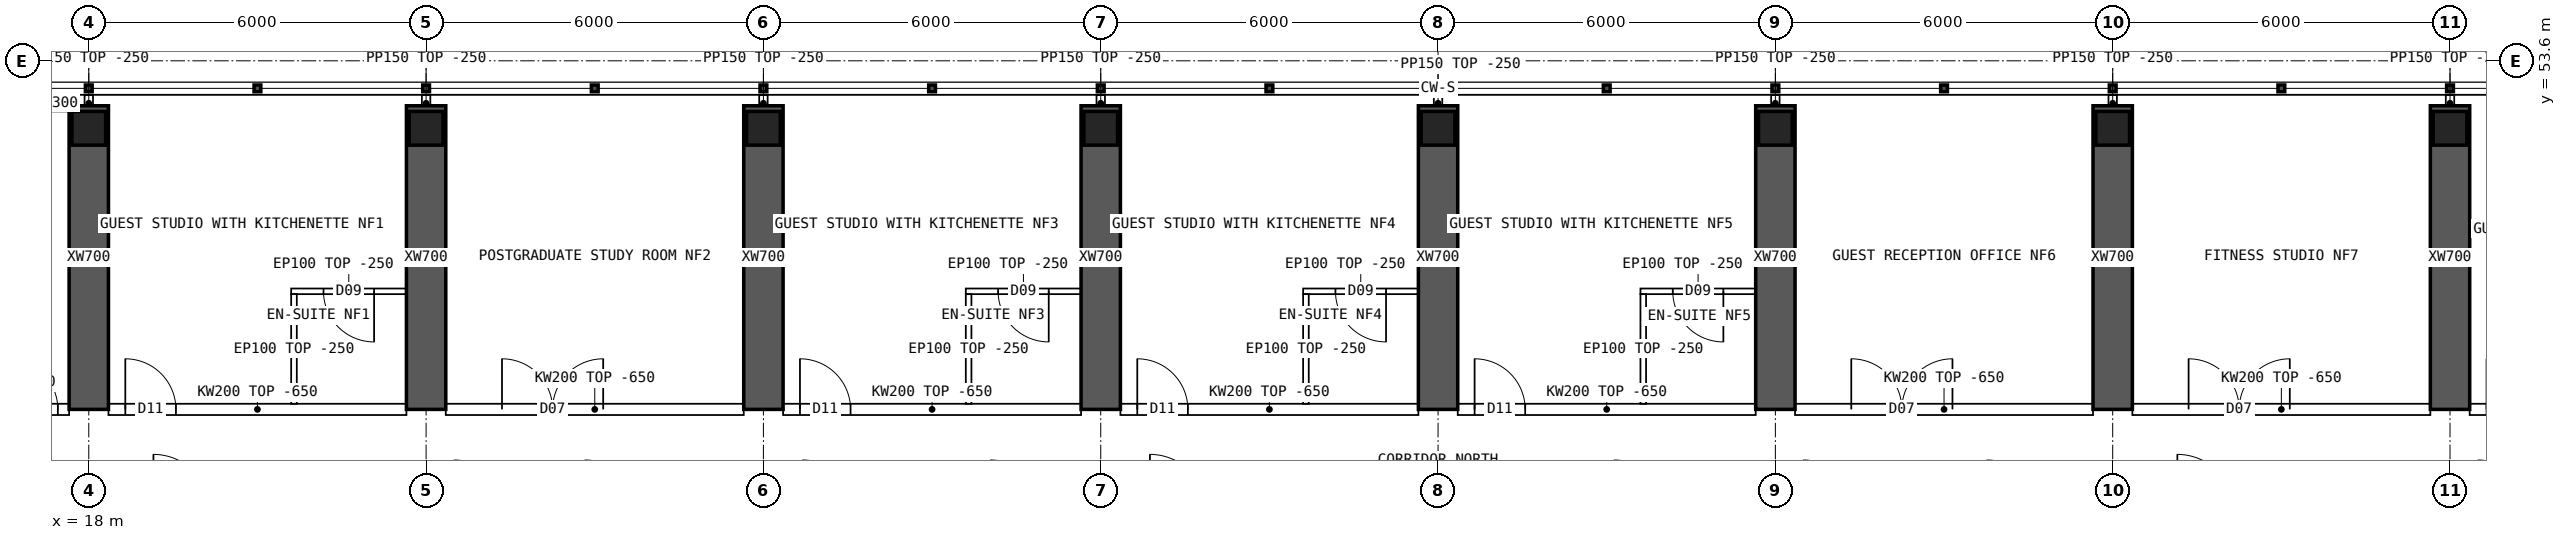
"""IFC4 building model, lengths in metres.
Left out: names, types, materials, properties, quantities, classifications, styles, units other than length and angle.
Written with IfcOpenShell. Run it as: python <this file> out.ifc"""

import sys

from ifc_helpers import new_model, si_unit, direction, frame, frame_2d, origin, origin_2d, place, context, subcontext, project, spatial, polyline, rectangle, hollow_rectangle, outline, extrude, element, fill, save


model = new_model("IFC4")
c1 = context("Model", 3, precision=1e-05, world=origin(), true_north=direction((0.0, 1.0)))
c2 = subcontext(c1, "Body", "Model", "MODEL_VIEW")
j1 = project(units=[si_unit("LENGTHUNIT", "METRE"), si_unit("PLANEANGLEUNIT", "RADIAN")], contexts=[c1])
p1 = place(None, origin())
s1 = spatial("IfcSite", under=j1, at=p1, CompositionType="ELEMENT")
p2 = place(p1, origin())
s2 = spatial("IfcBuilding", under=s1, at=p2, CompositionType="ELEMENT")
p3 = place(p2, frame((0.0, 0.0, 208.3)))
s3 = spatial("IfcBuildingStorey", under=s2, at=p3, CompositionType="ELEMENT", Elevation=208.3)
for number, where, z_axis, x_axis in (
    (1, (18.0, 52.4, 0.0), (0.0, 0.0, 1.0), (1.0, 0.0, 0.0)),
    (2, (24.0, 52.4, 0.0), (0.0, 0.0, 1.0), (1.0, 0.0, 0.0)),
    (3, (30.0, 52.4, 0.0), (0.0, 0.0, 1.0), (1.0, 0.0, 0.0)),
    (4, (36.0, 52.4, 0.0), (0.0, 0.0, 1.0), (1.0, 0.0, 0.0)),
    (5, (42.0, 52.4, 0.0), (0.0, 0.0, 1.0), (1.0, 0.0, 0.0)),
    (6, (48.0, 52.4, 0.0), (0.0, 0.0, 1.0), (1.0, 0.0, 0.0)),
    (7, (54.0, 52.4, 0.0), (0.0, 0.0, 1.0), (1.0, 0.0, 0.0)),
    (8, (60.0, 52.4, 0.0), (0.0, 0.0, 1.0), (1.0, 0.0, 0.0)),
):
    element("IfcColumn", number, at=place(p3, frame(where, z_axis=z_axis, x_axis=x_axis)), inside=s3, PredefinedType="COLUMN", context=c2, shape_type="SweptSolid", body=[
        extrude(hollow_rectangle(XDim=0.6, YDim=0.6, WallThickness=0.06, at=origin_2d()), origin(), (0.0, 0.0, 1.0), 4.5),
    ])
for number, where, z_axis, x_axis in (
    (9, (18.0, 47.4, 0.0), (0.0, 0.0, 1.0), (0.0, 1.0, 0.0)),
    (10, (24.0, 47.4, 0.0), (0.0, 0.0, 1.0), (0.0, 1.0, 0.0)),
    (11, (30.0, 47.4, 0.0), (0.0, 0.0, 1.0), (0.0, 1.0, 0.0)),
    (12, (36.0, 47.4, 0.0), (0.0, 0.0, 1.0), (0.0, 1.0, 0.0)),
    (13, (42.0, 47.4, 0.0), (0.0, 0.0, 1.0), (0.0, 1.0, 0.0)),
    (14, (48.0, 47.4, 0.0), (0.0, 0.0, 1.0), (0.0, 1.0, 0.0)),
    (15, (54.0, 47.4, 0.0), (0.0, 0.0, 1.0), (0.0, 1.0, 0.0)),
    (16, (60.0, 47.4, 0.0), (0.0, 0.0, 1.0), (0.0, 1.0, 0.0)),
):
    element("IfcWall", number, at=place(p3, frame(where, z_axis=z_axis, x_axis=x_axis)), inside=s3, PredefinedType="SHEAR", context=c2, shape_type="SweptSolid", body=[
        extrude(rectangle(XDim=5.4, YDim=0.7, at=frame_2d((2.7, 0.0))), origin(), (0.0, 0.0, 1.0), 4.5),
    ])
p4 = place(p3, frame((17.2, 52.85, 0.0), z_axis=(0.0, 0.0, 1.0), x_axis=(1.0, 0.0, 0.0)))
e17 = element("IfcWall", 17, at=p4, inside=s3, PredefinedType="SOLIDWALL", context=c2, shape_type="SweptSolid", body=[
    extrude(rectangle(XDim=0.45, YDim=0.3, at=frame_2d((0.225, 0.0))), origin(), (0.0, 0.0, 1.0), 4.25),
])
p5 = place(p3, frame((15.6, 47.4, 0.0), z_axis=(0.0, 0.0, 1.0), x_axis=(1.0, 0.0, 0.0)))
e18 = element("IfcWall", 18, at=p5, inside=s3, PredefinedType="SOLIDWALL", context=c2, shape_type="SweptSolid", body=[
    extrude(rectangle(XDim=2.05, YDim=0.2, at=frame_2d((1.025, 0.0))), origin(), (0.0, 0.0, 1.0), 4.25),
])
p6 = place(p5, frame((0.95, 0.0, 0.0)))
e19 = element("IfcOpeningElement", 19, at=p6, cuts=e18, PredefinedType="OPENING", context=c2, shape_type="SweptSolid", body=[
    extrude(rectangle(XDim=0.9, YDim=2.1, at=frame_2d((0.45, 1.05))), frame((0.0, 0.11, 0.0), z_axis=(0.0, -1.0, 0.0), x_axis=(1.0, 0.0, 0.0)), (0.0, 0.0, 1.0), 0.22),
])
p7 = place(p3, frame((18.35, 47.4, 0.0), z_axis=(0.0, 0.0, 1.0), x_axis=(1.0, 0.0, 0.0)))
e20 = element("IfcWall", 20, at=p7, inside=s3, PredefinedType="SOLIDWALL", context=c2, shape_type="SweptSolid", body=[
    extrude(outline(polyline([(0.0, 0.0), (5.3, 0.0), (5.3, 3.85), (0.0, 3.85), (0.0, 0.0)])), frame((0.0, 0.1, 0.0), z_axis=(0.0, -1.0, 0.0), x_axis=(1.0, 0.0, 0.0)), (0.0, 0.0, 1.0), 0.2),
])
p8 = place(p7, frame((0.3, 0.0, 0.0)))
e21 = element("IfcOpeningElement", 21, at=p8, cuts=e20, PredefinedType="OPENING", context=c2, shape_type="SweptSolid", body=[
    extrude(rectangle(XDim=0.9, YDim=2.1, at=frame_2d((0.45, 1.05))), frame((0.0, 0.11, 0.0), z_axis=(0.0, -1.0, 0.0), x_axis=(1.0, 0.0, 0.0)), (0.0, 0.0, 1.0), 0.22),
])
p9 = place(p3, frame((24.35, 47.4, 0.0), z_axis=(0.0, 0.0, 1.0), x_axis=(1.0, 0.0, 0.0)))
e22 = element("IfcWall", 22, at=p9, inside=s3, PredefinedType="SOLIDWALL", context=c2, shape_type="SweptSolid", body=[
    extrude(outline(polyline([(0.0, 0.0), (5.3, 0.0), (5.3, 3.85), (0.0, 3.85), (0.0, 0.0)])), frame((0.0, 0.1, 0.0), z_axis=(0.0, -1.0, 0.0), x_axis=(1.0, 0.0, 0.0)), (0.0, 0.0, 1.0), 0.2),
])
p10 = place(p9, frame((1.0, 0.0, 0.0)))
e23 = element("IfcOpeningElement", 23, at=p10, cuts=e22, PredefinedType="OPENING", context=c2, shape_type="SweptSolid", body=[
    extrude(rectangle(XDim=1.8, YDim=2.1, at=frame_2d((0.9, 1.05))), frame((0.0, 0.11, 0.0), z_axis=(0.0, -1.0, 0.0), x_axis=(1.0, 0.0, 0.0)), (0.0, 0.0, 1.0), 0.22),
])
p11 = place(p3, frame((30.35, 47.4, 0.0), z_axis=(0.0, 0.0, 1.0), x_axis=(1.0, 0.0, 0.0)))
e24 = element("IfcWall", 24, at=p11, inside=s3, PredefinedType="SOLIDWALL", context=c2, shape_type="SweptSolid", body=[
    extrude(outline(polyline([(0.0, 0.0), (5.3, 0.0), (5.3, 3.85), (0.0, 3.85), (0.0, 0.0)])), frame((0.0, 0.1, 0.0), z_axis=(0.0, -1.0, 0.0), x_axis=(1.0, 0.0, 0.0)), (0.0, 0.0, 1.0), 0.2),
])
p12 = place(p11, frame((0.3, 0.0, 0.0)))
e25 = element("IfcOpeningElement", 25, at=p12, cuts=e24, PredefinedType="OPENING", context=c2, shape_type="SweptSolid", body=[
    extrude(rectangle(XDim=0.9, YDim=2.1, at=frame_2d((0.45, 1.05))), frame((0.0, 0.11, 0.0), z_axis=(0.0, -1.0, 0.0), x_axis=(1.0, 0.0, 0.0)), (0.0, 0.0, 1.0), 0.22),
])
p13 = place(p3, frame((36.35, 47.4, 0.0), z_axis=(0.0, 0.0, 1.0), x_axis=(1.0, 0.0, 0.0)))
e26 = element("IfcWall", 26, at=p13, inside=s3, PredefinedType="SOLIDWALL", context=c2, shape_type="SweptSolid", body=[
    extrude(outline(polyline([(0.0, 0.0), (5.3, 0.0), (5.3, 3.85), (0.0, 3.85), (0.0, 0.0)])), frame((0.0, 0.1, 0.0), z_axis=(0.0, -1.0, 0.0), x_axis=(1.0, 0.0, 0.0)), (0.0, 0.0, 1.0), 0.2),
])
p14 = place(p13, frame((0.3, 0.0, 0.0)))
e27 = element("IfcOpeningElement", 27, at=p14, cuts=e26, PredefinedType="OPENING", context=c2, shape_type="SweptSolid", body=[
    extrude(rectangle(XDim=0.9, YDim=2.1, at=frame_2d((0.45, 1.05))), frame((0.0, 0.11, 0.0), z_axis=(0.0, -1.0, 0.0), x_axis=(1.0, 0.0, 0.0)), (0.0, 0.0, 1.0), 0.22),
])
p15 = place(p3, frame((42.35, 47.4, 0.0), z_axis=(0.0, 0.0, 1.0), x_axis=(1.0, 0.0, 0.0)))
e28 = element("IfcWall", 28, at=p15, inside=s3, PredefinedType="SOLIDWALL", context=c2, shape_type="SweptSolid", body=[
    extrude(outline(polyline([(0.0, 0.0), (5.3, 0.0), (5.3, 3.85), (0.0, 3.85), (0.0, 0.0)])), frame((0.0, 0.1, 0.0), z_axis=(0.0, -1.0, 0.0), x_axis=(1.0, 0.0, 0.0)), (0.0, 0.0, 1.0), 0.2),
])
p16 = place(p15, frame((0.3, 0.0, 0.0)))
e29 = element("IfcOpeningElement", 29, at=p16, cuts=e28, PredefinedType="OPENING", context=c2, shape_type="SweptSolid", body=[
    extrude(rectangle(XDim=0.9, YDim=2.1, at=frame_2d((0.45, 1.05))), frame((0.0, 0.11, 0.0), z_axis=(0.0, -1.0, 0.0), x_axis=(1.0, 0.0, 0.0)), (0.0, 0.0, 1.0), 0.22),
])
p17 = place(p3, frame((48.35, 47.4, 0.0), z_axis=(0.0, 0.0, 1.0), x_axis=(1.0, 0.0, 0.0)))
e30 = element("IfcWall", 30, at=p17, inside=s3, PredefinedType="SOLIDWALL", context=c2, shape_type="SweptSolid", body=[
    extrude(outline(polyline([(0.0, 0.0), (5.3, 0.0), (5.3, 3.85), (0.0, 3.85), (0.0, 0.0)])), frame((0.0, 0.1, 0.0), z_axis=(0.0, -1.0, 0.0), x_axis=(1.0, 0.0, 0.0)), (0.0, 0.0, 1.0), 0.2),
])
p18 = place(p17, frame((1.0, 0.0, 0.0)))
e31 = element("IfcOpeningElement", 31, at=p18, cuts=e30, PredefinedType="OPENING", context=c2, shape_type="SweptSolid", body=[
    extrude(rectangle(XDim=1.8, YDim=2.1, at=frame_2d((0.9, 1.05))), frame((0.0, 0.11, 0.0), z_axis=(0.0, -1.0, 0.0), x_axis=(1.0, 0.0, 0.0)), (0.0, 0.0, 1.0), 0.22),
])
p19 = place(p3, frame((54.35, 47.4, 0.0), z_axis=(0.0, 0.0, 1.0), x_axis=(1.0, 0.0, 0.0)))
e32 = element("IfcWall", 32, at=p19, inside=s3, PredefinedType="SOLIDWALL", context=c2, shape_type="SweptSolid", body=[
    extrude(outline(polyline([(0.0, 0.0), (5.3, 0.0), (5.3, 3.85), (0.0, 3.85), (0.0, 0.0)])), frame((0.0, 0.1, 0.0), z_axis=(0.0, -1.0, 0.0), x_axis=(1.0, 0.0, 0.0)), (0.0, 0.0, 1.0), 0.2),
])
p20 = place(p19, frame((1.0, 0.0, 0.0)))
e33 = element("IfcOpeningElement", 33, at=p20, cuts=e32, PredefinedType="OPENING", context=c2, shape_type="SweptSolid", body=[
    extrude(rectangle(XDim=1.8, YDim=2.1, at=frame_2d((0.9, 1.05))), frame((0.0, 0.11, 0.0), z_axis=(0.0, -1.0, 0.0), x_axis=(1.0, 0.0, 0.0)), (0.0, 0.0, 1.0), 0.22),
])
p21 = place(p3, frame((60.35, 47.4, 0.0), z_axis=(0.0, 0.0, 1.0), x_axis=(1.0, 0.0, 0.0)))
e34 = element("IfcWall", 34, at=p21, inside=s3, PredefinedType="SOLIDWALL", context=c2, shape_type="SweptSolid", body=[
    extrude(outline(polyline([(0.0, 0.0), (5.3, 0.0), (5.3, 3.85), (0.0, 3.85), (0.0, 0.0)])), frame((0.0, 0.1, 0.0), z_axis=(0.0, -1.0, 0.0), x_axis=(1.0, 0.0, 0.0)), (0.0, 0.0, 1.0), 0.2),
])
p22 = place(p21, frame((0.3, 0.0, 0.0)))
e35 = element("IfcOpeningElement", 35, at=p22, cuts=e34, PredefinedType="OPENING", context=c2, shape_type="SweptSolid", body=[
    extrude(rectangle(XDim=0.9, YDim=2.1, at=frame_2d((0.45, 1.05))), frame((0.0, 0.11, 0.0), z_axis=(0.0, -1.0, 0.0), x_axis=(1.0, 0.0, 0.0)), (0.0, 0.0, 1.0), 0.22),
])
p23 = place(p3, frame((21.6, 49.5, 0.0), z_axis=(0.0, 0.0, 1.0), x_axis=(1.0, 0.0, 0.0)))
e36 = element("IfcWall", 36, at=p23, inside=s3, PredefinedType="PARTITIONING", context=c2, shape_type="SweptSolid", body=[
    extrude(rectangle(XDim=2.05, YDim=0.1, at=frame_2d((1.025, 0.0))), origin(), (0.0, 0.0, 1.0), 4.25),
])
p24 = place(p23, frame((0.575, 0.0, 0.0)))
e37 = element("IfcOpeningElement", 37, at=p24, cuts=e36, PredefinedType="OPENING", context=c2, shape_type="SweptSolid", body=[
    extrude(rectangle(XDim=0.9, YDim=2.1, at=frame_2d((0.45, 1.05))), frame((0.0, 0.06, 0.0), z_axis=(0.0, -1.0, 0.0), x_axis=(1.0, 0.0, 0.0)), (0.0, 0.0, 1.0), 0.12),
])
p25 = place(p3, frame((21.65, 49.45, 0.0), z_axis=(0.0, 0.0, 1.0), x_axis=(0.0, -1.0, 0.0)))
e38 = element("IfcWall", 38, at=p25, inside=s3, PredefinedType="PARTITIONING", context=c2, shape_type="SweptSolid", body=[
    extrude(outline(polyline([(0.0, 0.0), (1.95, 0.0), (1.95, 3.85), (1.902, 3.85), (1.9, 4.25), (0.0, 4.25), (0.0, 0.0)])), frame((0.0, 0.05, 0.0), z_axis=(0.0, -1.0, 0.0), x_axis=(1.0, 0.0, 0.0)), (0.0, 0.0, 1.0), 0.1),
])
p26 = place(p3, frame((33.6, 49.5, 0.0), z_axis=(0.0, 0.0, 1.0), x_axis=(1.0, 0.0, 0.0)))
e39 = element("IfcWall", 39, at=p26, inside=s3, PredefinedType="PARTITIONING", context=c2, shape_type="SweptSolid", body=[
    extrude(rectangle(XDim=2.05, YDim=0.1, at=frame_2d((1.025, 0.0))), origin(), (0.0, 0.0, 1.0), 4.25),
])
p27 = place(p26, frame((0.575, 0.0, 0.0)))
e40 = element("IfcOpeningElement", 40, at=p27, cuts=e39, PredefinedType="OPENING", context=c2, shape_type="SweptSolid", body=[
    extrude(rectangle(XDim=0.9, YDim=2.1, at=frame_2d((0.45, 1.05))), frame((0.0, 0.06, 0.0), z_axis=(0.0, -1.0, 0.0), x_axis=(1.0, 0.0, 0.0)), (0.0, 0.0, 1.0), 0.12),
])
p28 = place(p3, frame((33.65, 49.45, 0.0), z_axis=(0.0, 0.0, 1.0), x_axis=(0.0, -1.0, 0.0)))
e41 = element("IfcWall", 41, at=p28, inside=s3, PredefinedType="PARTITIONING", context=c2, shape_type="SweptSolid", body=[
    extrude(outline(polyline([(0.0, 0.0), (1.95, 0.0), (1.95, 3.85), (1.902, 3.85), (1.9, 4.25), (0.0, 4.25), (0.0, 0.0)])), frame((0.0, 0.05, 0.0), z_axis=(0.0, -1.0, 0.0), x_axis=(1.0, 0.0, 0.0)), (0.0, 0.0, 1.0), 0.1),
])
p29 = place(p3, frame((39.6, 49.5, 0.0), z_axis=(0.0, 0.0, 1.0), x_axis=(1.0, 0.0, 0.0)))
e42 = element("IfcWall", 42, at=p29, inside=s3, PredefinedType="PARTITIONING", context=c2, shape_type="SweptSolid", body=[
    extrude(rectangle(XDim=2.05, YDim=0.1, at=frame_2d((1.025, 0.0))), origin(), (0.0, 0.0, 1.0), 4.25),
])
p30 = place(p29, frame((0.575, 0.0, 0.0)))
e43 = element("IfcOpeningElement", 43, at=p30, cuts=e42, PredefinedType="OPENING", context=c2, shape_type="SweptSolid", body=[
    extrude(rectangle(XDim=0.9, YDim=2.1, at=frame_2d((0.45, 1.05))), frame((0.0, 0.06, 0.0), z_axis=(0.0, -1.0, 0.0), x_axis=(1.0, 0.0, 0.0)), (0.0, 0.0, 1.0), 0.12),
])
p31 = place(p3, frame((39.65, 49.45, 0.0), z_axis=(0.0, 0.0, 1.0), x_axis=(0.0, -1.0, 0.0)))
e44 = element("IfcWall", 44, at=p31, inside=s3, PredefinedType="PARTITIONING", context=c2, shape_type="SweptSolid", body=[
    extrude(outline(polyline([(0.0, 0.0), (1.95, 0.0), (1.95, 3.85), (1.902, 3.85), (1.9, 4.25), (0.0, 4.25), (0.0, 0.0)])), frame((0.0, 0.05, 0.0), z_axis=(0.0, -1.0, 0.0), x_axis=(1.0, 0.0, 0.0)), (0.0, 0.0, 1.0), 0.1),
])
p32 = place(p3, frame((45.6, 49.5, 0.0), z_axis=(0.0, 0.0, 1.0), x_axis=(1.0, 0.0, 0.0)))
e45 = element("IfcWall", 45, at=p32, inside=s3, PredefinedType="PARTITIONING", context=c2, shape_type="SweptSolid", body=[
    extrude(rectangle(XDim=2.05, YDim=0.1, at=frame_2d((1.025, 0.0))), origin(), (0.0, 0.0, 1.0), 4.25),
])
p33 = place(p32, frame((0.575, 0.0, 0.0)))
e46 = element("IfcOpeningElement", 46, at=p33, cuts=e45, PredefinedType="OPENING", context=c2, shape_type="SweptSolid", body=[
    extrude(rectangle(XDim=0.9, YDim=2.1, at=frame_2d((0.45, 1.05))), frame((0.0, 0.06, 0.0), z_axis=(0.0, -1.0, 0.0), x_axis=(1.0, 0.0, 0.0)), (0.0, 0.0, 1.0), 0.12),
])
p34 = place(p3, frame((45.65, 49.45, 0.0), z_axis=(0.0, 0.0, 1.0), x_axis=(0.0, -1.0, 0.0)))
e47 = element("IfcWall", 47, at=p34, inside=s3, PredefinedType="PARTITIONING", context=c2, shape_type="SweptSolid", body=[
    extrude(outline(polyline([(0.0, 0.0), (1.95, 0.0), (1.95, 3.85), (1.902, 3.85), (1.9, 4.25), (0.0, 4.25), (0.0, 0.0)])), frame((0.0, 0.05, 0.0), z_axis=(0.0, -1.0, 0.0), x_axis=(1.0, 0.0, 0.0)), (0.0, 0.0, 1.0), 0.1),
])
for number, where, z_axis, x_axis in (
    (48, (18.0, 52.7, 0.0), (0.0, 0.0, 1.0), (0.0, 1.0, 0.0)),
    (49, (24.0, 52.7, 0.0), (0.0, 0.0, 1.0), (0.0, 1.0, 0.0)),
    (50, (30.0, 52.7, 0.0), (0.0, 0.0, 1.0), (0.0, 1.0, 0.0)),
    (51, (36.0, 52.7, 0.0), (0.0, 0.0, 1.0), (0.0, 1.0, 0.0)),
    (52, (42.0, 52.7, 0.0), (0.0, 0.0, 1.0), (0.0, 1.0, 0.0)),
    (53, (48.0, 52.7, 0.0), (0.0, 0.0, 1.0), (0.0, 1.0, 0.0)),
    (54, (54.0, 52.7, 0.0), (0.0, 0.0, 1.0), (0.0, 1.0, 0.0)),
    (55, (60.0, 52.7, 0.0), (0.0, 0.0, 1.0), (0.0, 1.0, 0.0)),
):
    element("IfcWall", number, at=place(p3, frame(where, z_axis=z_axis, x_axis=x_axis)), inside=s3, PredefinedType="PARTITIONING", context=c2, shape_type="SweptSolid", body=[
        extrude(rectangle(XDim=0.29, YDim=0.15, at=frame_2d((0.145, 0.0))), origin(), (0.0, 0.0, 1.0), 4.25),
    ])
p35 = place(p24, origin())
e56 = element("IfcDoor", 56, at=p35, inside=s3, OperationType="SINGLE_SWING_RIGHT", PredefinedType="DOOR", context=c2, shape_type="SweptSolid", body=[
    extrude(rectangle(XDim=0.9, YDim=2.1, at=frame_2d((0.45, 1.05))), frame((0.0, 0.025, 0.0), z_axis=(0.0, -1.0, 0.0), x_axis=(1.0, 0.0, 0.0)), (0.0, 0.0, 1.0), 0.05),
])
fill(e37, e56)
p36 = place(p8, origin())
e57 = element("IfcDoor", 57, at=p36, inside=s3, OperationType="SINGLE_SWING_LEFT", PredefinedType="DOOR", context=c2, shape_type="SweptSolid", body=[
    extrude(rectangle(XDim=0.9, YDim=2.1, at=frame_2d((0.45, 1.05))), frame((0.0, 0.025, 0.0), z_axis=(0.0, -1.0, 0.0), x_axis=(1.0, 0.0, 0.0)), (0.0, 0.0, 1.0), 0.05),
])
fill(e21, e57)
p37 = place(p10, origin())
e58 = element("IfcDoor", 58, at=p37, inside=s3, OperationType="DOUBLE_DOOR_SINGLE_SWING", PredefinedType="DOOR", context=c2, shape_type="SweptSolid", body=[
    extrude(rectangle(XDim=1.8, YDim=2.1, at=frame_2d((0.9, 1.05))), frame((0.0, 0.025, 0.0), z_axis=(0.0, -1.0, 0.0), x_axis=(1.0, 0.0, 0.0)), (0.0, 0.0, 1.0), 0.05),
])
fill(e23, e58)
p38 = place(p27, origin())
e59 = element("IfcDoor", 59, at=p38, inside=s3, OperationType="SINGLE_SWING_RIGHT", PredefinedType="DOOR", context=c2, shape_type="SweptSolid", body=[
    extrude(rectangle(XDim=0.9, YDim=2.1, at=frame_2d((0.45, 1.05))), frame((0.0, 0.025, 0.0), z_axis=(0.0, -1.0, 0.0), x_axis=(1.0, 0.0, 0.0)), (0.0, 0.0, 1.0), 0.05),
])
fill(e40, e59)
p39 = place(p12, origin())
e60 = element("IfcDoor", 60, at=p39, inside=s3, OperationType="SINGLE_SWING_LEFT", PredefinedType="DOOR", context=c2, shape_type="SweptSolid", body=[
    extrude(rectangle(XDim=0.9, YDim=2.1, at=frame_2d((0.45, 1.05))), frame((0.0, 0.025, 0.0), z_axis=(0.0, -1.0, 0.0), x_axis=(1.0, 0.0, 0.0)), (0.0, 0.0, 1.0), 0.05),
])
fill(e25, e60)
p40 = place(p30, origin())
e61 = element("IfcDoor", 61, at=p40, inside=s3, OperationType="SINGLE_SWING_RIGHT", PredefinedType="DOOR", context=c2, shape_type="SweptSolid", body=[
    extrude(rectangle(XDim=0.9, YDim=2.1, at=frame_2d((0.45, 1.05))), frame((0.0, 0.025, 0.0), z_axis=(0.0, -1.0, 0.0), x_axis=(1.0, 0.0, 0.0)), (0.0, 0.0, 1.0), 0.05),
])
fill(e43, e61)
p41 = place(p14, origin())
e62 = element("IfcDoor", 62, at=p41, inside=s3, OperationType="SINGLE_SWING_LEFT", PredefinedType="DOOR", context=c2, shape_type="SweptSolid", body=[
    extrude(rectangle(XDim=0.9, YDim=2.1, at=frame_2d((0.45, 1.05))), frame((0.0, 0.025, 0.0), z_axis=(0.0, -1.0, 0.0), x_axis=(1.0, 0.0, 0.0)), (0.0, 0.0, 1.0), 0.05),
])
fill(e27, e62)
p42 = place(p33, origin())
e63 = element("IfcDoor", 63, at=p42, inside=s3, OperationType="SINGLE_SWING_RIGHT", PredefinedType="DOOR", context=c2, shape_type="SweptSolid", body=[
    extrude(rectangle(XDim=0.9, YDim=2.1, at=frame_2d((0.45, 1.05))), frame((0.0, 0.025, 0.0), z_axis=(0.0, -1.0, 0.0), x_axis=(1.0, 0.0, 0.0)), (0.0, 0.0, 1.0), 0.05),
])
fill(e46, e63)
p43 = place(p16, origin())
e64 = element("IfcDoor", 64, at=p43, inside=s3, OperationType="SINGLE_SWING_LEFT", PredefinedType="DOOR", context=c2, shape_type="SweptSolid", body=[
    extrude(rectangle(XDim=0.9, YDim=2.1, at=frame_2d((0.45, 1.05))), frame((0.0, 0.025, 0.0), z_axis=(0.0, -1.0, 0.0), x_axis=(1.0, 0.0, 0.0)), (0.0, 0.0, 1.0), 0.05),
])
fill(e29, e64)
p44 = place(p18, origin())
e65 = element("IfcDoor", 65, at=p44, inside=s3, OperationType="DOUBLE_DOOR_SINGLE_SWING", PredefinedType="DOOR", context=c2, shape_type="SweptSolid", body=[
    extrude(rectangle(XDim=1.8, YDim=2.1, at=frame_2d((0.9, 1.05))), frame((0.0, 0.025, 0.0), z_axis=(0.0, -1.0, 0.0), x_axis=(1.0, 0.0, 0.0)), (0.0, 0.0, 1.0), 0.05),
])
fill(e31, e65)
p45 = place(p20, origin())
e66 = element("IfcDoor", 66, at=p45, inside=s3, OperationType="DOUBLE_DOOR_SINGLE_SWING", PredefinedType="DOOR", context=c2, shape_type="SweptSolid", body=[
    extrude(rectangle(XDim=1.8, YDim=2.1, at=frame_2d((0.9, 1.05))), frame((0.0, 0.025, 0.0), z_axis=(0.0, -1.0, 0.0), x_axis=(1.0, 0.0, 0.0)), (0.0, 0.0, 1.0), 0.05),
])
fill(e33, e66)
p46 = place(p6, origin())
e67 = element("IfcDoor", 67, at=p46, inside=s3, OperationType="SINGLE_SWING_LEFT", PredefinedType="DOOR", context=c2, shape_type="SweptSolid", body=[
    extrude(rectangle(XDim=0.9, YDim=2.1, at=frame_2d((0.45, 1.05))), frame((0.0, 0.025, 0.0), z_axis=(0.0, -1.0, 0.0), x_axis=(1.0, 0.0, 0.0)), (0.0, 0.0, 1.0), 0.05),
])
fill(e19, e67)
save(model, sys.argv[1])
